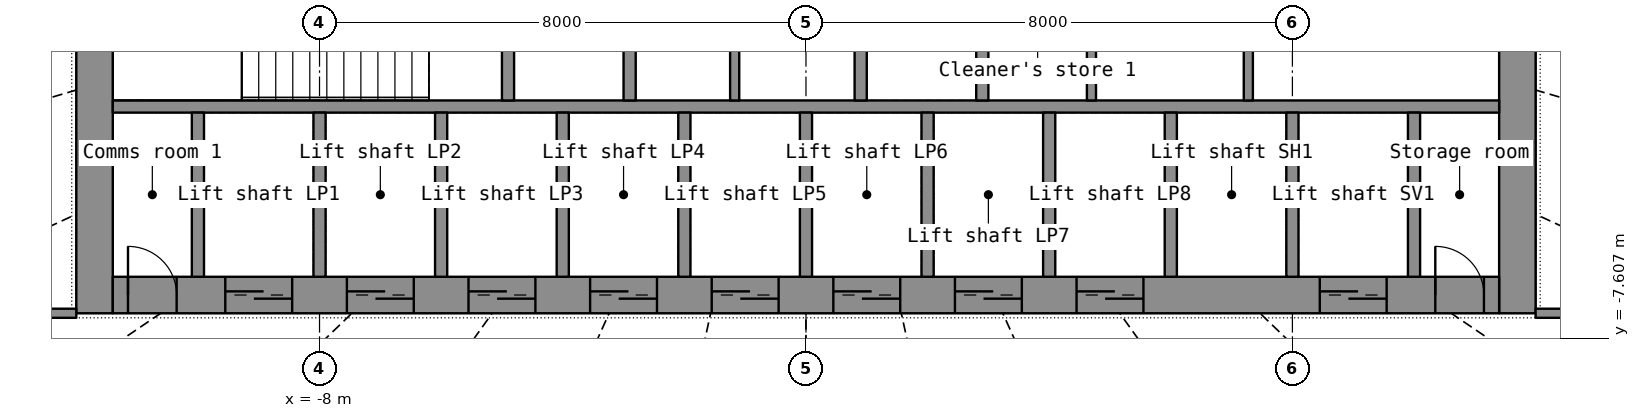
"""IFC4 building model, lengths in metres.
Left out: names, types, materials, properties, quantities, classifications, styles, units other than length and angle.
Written with IfcOpenShell. Run it as: python <this file> out.ifc"""

import sys

from ifc_helpers import new_model, si_unit, direction, frame, frame_2d, origin, place, context, subcontext, project, spatial, rectangle, extrude, element, fill, save


model = new_model("IFC4")
c1 = context("Model", 3, precision=1e-05, world=origin(), true_north=direction((0.0, 1.0)))
c2 = subcontext(c1, "Body", "Model", "MODEL_VIEW")
j1 = project(units=[si_unit("LENGTHUNIT", "METRE"), si_unit("PLANEANGLEUNIT", "RADIAN")], contexts=[c1])
p1 = place(None, origin())
s1 = spatial("IfcSite", under=j1, at=p1, CompositionType="ELEMENT")
p2 = place(p1, origin())
s2 = spatial("IfcBuilding", under=s1, at=p2, CompositionType="ELEMENT")
p3 = place(p2, frame((0.0, 0.0, 24.5)))
s3 = spatial("IfcBuildingStorey", under=s2, at=p3, CompositionType="ELEMENT", Elevation=24.5)
p4 = place(p3, frame((-11.7, -7.2, 0.0), z_axis=(0.0, 0.0, 1.0), x_axis=(0.0, 1.0, 0.0)))
e1 = element("IfcWall", 1, at=p4, inside=s3, PredefinedType="SHEAR", context=c2, shape_type="SweptSolid", body=[
    extrude(rectangle(XDim=14.4, YDim=0.6, at=frame_2d((7.2, 0.0))), origin(), (0.0, 0.0, 1.0), 3.8),
])
p5 = place(p4, frame((6.5, 0.0, 0.0)))
e2 = element("IfcOpeningElement", 2, at=p5, cuts=e1, PredefinedType="OPENING", context=c2, shape_type="SweptSolid", body=[
    extrude(rectangle(XDim=1.4, YDim=2.2, at=frame_2d((0.7, 1.1))), frame((0.0, 0.31, 0.0), z_axis=(0.0, -1.0, 0.0), x_axis=(1.0, 0.0, 0.0)), (0.0, 0.0, 1.0), 0.62),
])
p6 = place(p3, frame((11.7, -7.2, 0.0), z_axis=(0.0, 0.0, 1.0), x_axis=(0.0, 1.0, 0.0)))
e3 = element("IfcWall", 3, at=p6, inside=s3, PredefinedType="SHEAR", context=c2, shape_type="SweptSolid", body=[
    extrude(rectangle(XDim=14.4, YDim=0.6, at=frame_2d((7.2, 0.0))), origin(), (0.0, 0.0, 1.0), 3.8),
])
p7 = place(p6, frame((6.5, 0.0, 0.0)))
e4 = element("IfcOpeningElement", 4, at=p7, cuts=e3, PredefinedType="OPENING", context=c2, shape_type="SweptSolid", body=[
    extrude(rectangle(XDim=1.4, YDim=2.2, at=frame_2d((0.7, 1.1))), frame((0.0, 0.31, 0.0), z_axis=(0.0, -1.0, 0.0), x_axis=(1.0, 0.0, 0.0)), (0.0, 0.0, 1.0), 0.62),
])
p8 = place(p3, frame((-11.4, -6.9, 0.0), z_axis=(0.0, 0.0, 1.0), x_axis=(1.0, 0.0, 0.0)))
e5 = element("IfcWall", 5, at=p8, inside=s3, PredefinedType="SHEAR", context=c2, shape_type="SweptSolid", body=[
    extrude(rectangle(XDim=22.8, YDim=0.6, at=frame_2d((11.4, 0.0))), origin(), (0.0, 0.0, 1.0), 3.8),
])
p9 = place(p8, frame((1.85, 0.0, 0.0)))
e6 = element("IfcOpeningElement", 6, at=p9, cuts=e5, PredefinedType="OPENING", context=c2, shape_type="SweptSolid", body=[
    extrude(rectangle(XDim=1.1, YDim=2.2, at=frame_2d((0.55, 1.1))), frame((0.0, 0.31, 0.0), z_axis=(0.0, -1.0, 0.0), x_axis=(1.0, 0.0, 0.0)), (0.0, 0.0, 1.0), 0.62),
])
p10 = place(p8, frame((3.85, 0.0, 0.0)))
e7 = element("IfcOpeningElement", 7, at=p10, cuts=e5, PredefinedType="OPENING", context=c2, shape_type="SweptSolid", body=[
    extrude(rectangle(XDim=1.1, YDim=2.2, at=frame_2d((0.55, 1.1))), frame((0.0, 0.31, 0.0), z_axis=(0.0, -1.0, 0.0), x_axis=(1.0, 0.0, 0.0)), (0.0, 0.0, 1.0), 0.62),
])
p11 = place(p8, frame((5.85, 0.0, 0.0)))
e8 = element("IfcOpeningElement", 8, at=p11, cuts=e5, PredefinedType="OPENING", context=c2, shape_type="SweptSolid", body=[
    extrude(rectangle(XDim=1.1, YDim=2.2, at=frame_2d((0.55, 1.1))), frame((0.0, 0.31, 0.0), z_axis=(0.0, -1.0, 0.0), x_axis=(1.0, 0.0, 0.0)), (0.0, 0.0, 1.0), 0.62),
])
p12 = place(p8, frame((7.85, 0.0, 0.0)))
e9 = element("IfcOpeningElement", 9, at=p12, cuts=e5, PredefinedType="OPENING", context=c2, shape_type="SweptSolid", body=[
    extrude(rectangle(XDim=1.1, YDim=2.2, at=frame_2d((0.55, 1.1))), frame((0.0, 0.31, 0.0), z_axis=(0.0, -1.0, 0.0), x_axis=(1.0, 0.0, 0.0)), (0.0, 0.0, 1.0), 0.62),
])
p13 = place(p8, frame((9.85, 0.0, 0.0)))
e10 = element("IfcOpeningElement", 10, at=p13, cuts=e5, PredefinedType="OPENING", context=c2, shape_type="SweptSolid", body=[
    extrude(rectangle(XDim=1.1, YDim=2.2, at=frame_2d((0.55, 1.1))), frame((0.0, 0.31, 0.0), z_axis=(0.0, -1.0, 0.0), x_axis=(1.0, 0.0, 0.0)), (0.0, 0.0, 1.0), 0.62),
])
p14 = place(p8, frame((11.85, 0.0, 0.0)))
e11 = element("IfcOpeningElement", 11, at=p14, cuts=e5, PredefinedType="OPENING", context=c2, shape_type="SweptSolid", body=[
    extrude(rectangle(XDim=1.1, YDim=2.2, at=frame_2d((0.55, 1.1))), frame((0.0, 0.31, 0.0), z_axis=(0.0, -1.0, 0.0), x_axis=(1.0, 0.0, 0.0)), (0.0, 0.0, 1.0), 0.62),
])
p15 = place(p8, frame((13.85, 0.0, 0.0)))
e12 = element("IfcOpeningElement", 12, at=p15, cuts=e5, PredefinedType="OPENING", context=c2, shape_type="SweptSolid", body=[
    extrude(rectangle(XDim=1.1, YDim=2.2, at=frame_2d((0.55, 1.1))), frame((0.0, 0.31, 0.0), z_axis=(0.0, -1.0, 0.0), x_axis=(1.0, 0.0, 0.0)), (0.0, 0.0, 1.0), 0.62),
])
p16 = place(p8, frame((15.85, 0.0, 0.0)))
e13 = element("IfcOpeningElement", 13, at=p16, cuts=e5, PredefinedType="OPENING", context=c2, shape_type="SweptSolid", body=[
    extrude(rectangle(XDim=1.1, YDim=2.2, at=frame_2d((0.55, 1.1))), frame((0.0, 0.31, 0.0), z_axis=(0.0, -1.0, 0.0), x_axis=(1.0, 0.0, 0.0)), (0.0, 0.0, 1.0), 0.62),
])
p17 = place(p8, frame((19.85, 0.0, 0.0)))
e14 = element("IfcOpeningElement", 14, at=p17, cuts=e5, PredefinedType="OPENING", context=c2, shape_type="SweptSolid", body=[
    extrude(rectangle(XDim=1.1, YDim=2.2, at=frame_2d((0.55, 1.1))), frame((0.0, 0.31, 0.0), z_axis=(0.0, -1.0, 0.0), x_axis=(1.0, 0.0, 0.0)), (0.0, 0.0, 1.0), 0.62),
])
p18 = place(p8, frame((0.25, 0.0, 0.0)))
e15 = element("IfcOpeningElement", 15, at=p18, cuts=e5, PredefinedType="OPENING", context=c2, shape_type="SweptSolid", body=[
    extrude(rectangle(XDim=0.8, YDim=2.05, at=frame_2d((0.4, 1.025))), frame((0.0, 0.31, 0.0), z_axis=(0.0, -1.0, 0.0), x_axis=(1.0, 0.0, 0.0)), (0.0, 0.0, 1.0), 0.62),
])
p19 = place(p8, frame((21.75, 0.0, 0.0)))
e16 = element("IfcOpeningElement", 16, at=p19, cuts=e5, PredefinedType="OPENING", context=c2, shape_type="SweptSolid", body=[
    extrude(rectangle(XDim=0.8, YDim=2.05, at=frame_2d((0.4, 1.025))), frame((0.0, 0.31, 0.0), z_axis=(0.0, -1.0, 0.0), x_axis=(1.0, 0.0, 0.0)), (0.0, 0.0, 1.0), 0.62),
])
p20 = place(p3, frame((-11.4, -3.8, 0.0), z_axis=(0.0, 0.0, 1.0), x_axis=(1.0, 0.0, 0.0)))
e17 = element("IfcWall", 17, at=p20, inside=s3, PredefinedType="SHEAR", context=c2, shape_type="SweptSolid", body=[
    extrude(rectangle(XDim=22.8, YDim=0.2, at=frame_2d((11.4, 0.0))), origin(), (0.0, 0.0, 1.0), 3.8),
])
for number, where, z_axis, x_axis in (
    (18, (-10.0, -6.6, 0.0), (0.0, 0.0, 1.0), (0.0, 1.0, 0.0)),
    (19, (-8.0, -6.6, 0.0), (0.0, 0.0, 1.0), (0.0, 1.0, 0.0)),
    (20, (-6.0, -6.6, 0.0), (0.0, 0.0, 1.0), (0.0, 1.0, 0.0)),
    (21, (-4.0, -6.6, 0.0), (0.0, 0.0, 1.0), (0.0, 1.0, 0.0)),
    (22, (-2.0, -6.6, 0.0), (0.0, 0.0, 1.0), (0.0, 1.0, 0.0)),
    (23, (0.0, -6.6, 0.0), (0.0, 0.0, 1.0), (0.0, 1.0, 0.0)),
    (24, (2.0, -6.6, 0.0), (0.0, 0.0, 1.0), (0.0, 1.0, 0.0)),
    (25, (4.0, -6.6, 0.0), (0.0, 0.0, 1.0), (0.0, 1.0, 0.0)),
    (26, (6.0, -6.6, 0.0), (0.0, 0.0, 1.0), (0.0, 1.0, 0.0)),
    (27, (8.0, -6.6, 0.0), (0.0, 0.0, 1.0), (0.0, 1.0, 0.0)),
    (28, (10.0, -6.6, 0.0), (0.0, 0.0, 1.0), (0.0, 1.0, 0.0)),
):
    element("IfcWall", number, at=place(p3, frame(where, z_axis=z_axis, x_axis=x_axis)), inside=s3, PredefinedType="SHEAR", context=c2, shape_type="SweptSolid", body=[
        extrude(rectangle(XDim=2.7, YDim=0.2, at=frame_2d((1.35, 0.0))), origin(), (0.0, 0.0, 1.0), 3.8),
    ])
p21 = place(p3, frame((-2.9, -3.7, 0.0), z_axis=(0.0, 0.0, 1.0), x_axis=(0.0, 1.0, 0.0)))
e29 = element("IfcWall", 29, at=p21, inside=s3, PredefinedType="SHEAR", context=c2, shape_type="SweptSolid", body=[
    extrude(rectangle(XDim=7.4, YDim=0.2, at=frame_2d((3.7, 0.0))), origin(), (0.0, 0.0, 1.0), 3.8),
])
p22 = place(p21, frame((3.1, 0.0, 0.0)))
e30 = element("IfcOpeningElement", 30, at=p22, cuts=e29, PredefinedType="OPENING", context=c2, shape_type="SweptSolid", body=[
    extrude(rectangle(XDim=1.2, YDim=2.2, at=frame_2d((0.6, 1.1))), frame((0.0, 0.11, 0.0), z_axis=(0.0, -1.0, 0.0), x_axis=(1.0, 0.0, 0.0)), (0.0, 0.0, 1.0), 0.22),
])
p23 = place(p3, frame((2.9, -3.7, 0.0), z_axis=(0.0, 0.0, 1.0), x_axis=(0.0, 1.0, 0.0)))
e31 = element("IfcWall", 31, at=p23, inside=s3, PredefinedType="SHEAR", context=c2, shape_type="SweptSolid", body=[
    extrude(rectangle(XDim=7.4, YDim=0.2, at=frame_2d((3.7, 0.0))), origin(), (0.0, 0.0, 1.0), 3.8),
])
p24 = place(p23, frame((3.1, 0.0, 0.0)))
e32 = element("IfcOpeningElement", 32, at=p24, cuts=e31, PredefinedType="OPENING", context=c2, shape_type="SweptSolid", body=[
    extrude(rectangle(XDim=1.2, YDim=2.2, at=frame_2d((0.6, 1.1))), frame((0.0, 0.11, 0.0), z_axis=(0.0, -1.0, 0.0), x_axis=(1.0, 0.0, 0.0)), (0.0, 0.0, 1.0), 0.22),
])
for number, where, z_axis, x_axis in (
    (33, (0.9, -3.7, 0.0), (0.0, 0.0, 1.0), (0.0, 1.0, 0.0)),
    (34, (-4.9, -3.7, 0.0), (0.0, 0.0, 1.0), (0.0, 1.0, 0.0)),
):
    element("IfcWall", number, at=place(p3, frame(where, z_axis=z_axis, x_axis=x_axis)), inside=s3, PredefinedType="SHEAR", context=c2, shape_type="SweptSolid", body=[
        extrude(rectangle(XDim=2.35, YDim=0.2, at=frame_2d((1.175, 0.0))), origin(), (0.0, 0.0, 1.0), 3.8),
    ])
for number, where, z_axis, x_axis in (
    (35, (4.695, -3.7, 0.0), (0.0, 0.0, 1.0), (0.0, 1.0, 0.0)),
    (36, (7.275, -3.7, 0.0), (0.0, 0.0, 1.0), (0.0, 1.0, 0.0)),
    (37, (-1.173, -3.7, 0.0), (0.0, 0.0, 1.0), (0.0, 1.0, 0.0)),
):
    element("IfcWall", number, at=place(p3, frame(where, z_axis=z_axis, x_axis=x_axis)), inside=s3, PredefinedType="PARTITIONING", context=c2, shape_type="SweptSolid", body=[
        extrude(rectangle(XDim=2.35, YDim=0.15, at=frame_2d((1.175, 0.0))), origin(), (0.0, 0.0, 1.0), 3.8),
    ])
p25 = place(p3, frame((-12.0, -7.2, 0.0), z_axis=(0.0, 0.0, 1.0), x_axis=(-1.0, 0.0, 0.0)))
e38 = element("IfcWall", 38, at=p25, inside=s3, PredefinedType="PARTITIONING", context=c2, shape_type="SweptSolid", body=[
    extrude(rectangle(XDim=3.923, YDim=0.15, at=frame_2d((1.961, 0.0))), origin(), (0.0, 0.0, 1.0), 2.8),
])
p26 = place(p25, frame((1.062, 0.0, 1.0)))
e39 = element("IfcOpeningElement", 39, at=p26, cuts=e38, PredefinedType="OPENING", context=c2, shape_type="SweptSolid", body=[
    extrude(rectangle(XDim=1.8, YDim=1.2, at=frame_2d((0.9, 0.6))), frame((0.0, 0.085, 0.0), z_axis=(0.0, -1.0, 0.0), x_axis=(1.0, 0.0, 0.0)), (0.0, 0.0, 1.0), 0.17),
])
p27 = place(p3, frame((15.923, -7.2, 0.0), z_axis=(0.0, 0.0, 1.0), x_axis=(-1.0, 0.0, 0.0)))
e40 = element("IfcWall", 40, at=p27, inside=s3, PredefinedType="PARTITIONING", context=c2, shape_type="SweptSolid", body=[
    extrude(rectangle(XDim=3.923, YDim=0.15, at=frame_2d((1.961, 0.0))), origin(), (0.0, 0.0, 1.0), 2.8),
])
p28 = place(p9, origin())
e41 = element("IfcDoor", 41, at=p28, inside=s3, OperationType="DOUBLE_DOOR_SLIDING", PredefinedType="DOOR", context=c2, shape_type="SweptSolid", body=[
    extrude(rectangle(XDim=1.1, YDim=2.2, at=frame_2d((0.55, 1.1))), frame((0.0, 0.025, 0.0), z_axis=(0.0, -1.0, 0.0), x_axis=(1.0, 0.0, 0.0)), (0.0, 0.0, 1.0), 0.05),
])
fill(e6, e41)
p29 = place(p10, origin())
e42 = element("IfcDoor", 42, at=p29, inside=s3, OperationType="DOUBLE_DOOR_SLIDING", PredefinedType="DOOR", context=c2, shape_type="SweptSolid", body=[
    extrude(rectangle(XDim=1.1, YDim=2.2, at=frame_2d((0.55, 1.1))), frame((0.0, 0.025, 0.0), z_axis=(0.0, -1.0, 0.0), x_axis=(1.0, 0.0, 0.0)), (0.0, 0.0, 1.0), 0.05),
])
fill(e7, e42)
p30 = place(p11, origin())
e43 = element("IfcDoor", 43, at=p30, inside=s3, OperationType="DOUBLE_DOOR_SLIDING", PredefinedType="DOOR", context=c2, shape_type="SweptSolid", body=[
    extrude(rectangle(XDim=1.1, YDim=2.2, at=frame_2d((0.55, 1.1))), frame((0.0, 0.025, 0.0), z_axis=(0.0, -1.0, 0.0), x_axis=(1.0, 0.0, 0.0)), (0.0, 0.0, 1.0), 0.05),
])
fill(e8, e43)
p31 = place(p12, origin())
e44 = element("IfcDoor", 44, at=p31, inside=s3, OperationType="DOUBLE_DOOR_SLIDING", PredefinedType="DOOR", context=c2, shape_type="SweptSolid", body=[
    extrude(rectangle(XDim=1.1, YDim=2.2, at=frame_2d((0.55, 1.1))), frame((0.0, 0.025, 0.0), z_axis=(0.0, -1.0, 0.0), x_axis=(1.0, 0.0, 0.0)), (0.0, 0.0, 1.0), 0.05),
])
fill(e9, e44)
p32 = place(p13, origin())
e45 = element("IfcDoor", 45, at=p32, inside=s3, OperationType="DOUBLE_DOOR_SLIDING", PredefinedType="DOOR", context=c2, shape_type="SweptSolid", body=[
    extrude(rectangle(XDim=1.1, YDim=2.2, at=frame_2d((0.55, 1.1))), frame((0.0, 0.025, 0.0), z_axis=(0.0, -1.0, 0.0), x_axis=(1.0, 0.0, 0.0)), (0.0, 0.0, 1.0), 0.05),
])
fill(e10, e45)
p33 = place(p14, origin())
e46 = element("IfcDoor", 46, at=p33, inside=s3, OperationType="DOUBLE_DOOR_SLIDING", PredefinedType="DOOR", context=c2, shape_type="SweptSolid", body=[
    extrude(rectangle(XDim=1.1, YDim=2.2, at=frame_2d((0.55, 1.1))), frame((0.0, 0.025, 0.0), z_axis=(0.0, -1.0, 0.0), x_axis=(1.0, 0.0, 0.0)), (0.0, 0.0, 1.0), 0.05),
])
fill(e11, e46)
p34 = place(p15, origin())
e47 = element("IfcDoor", 47, at=p34, inside=s3, OperationType="DOUBLE_DOOR_SLIDING", PredefinedType="DOOR", context=c2, shape_type="SweptSolid", body=[
    extrude(rectangle(XDim=1.1, YDim=2.2, at=frame_2d((0.55, 1.1))), frame((0.0, 0.025, 0.0), z_axis=(0.0, -1.0, 0.0), x_axis=(1.0, 0.0, 0.0)), (0.0, 0.0, 1.0), 0.05),
])
fill(e12, e47)
p35 = place(p16, origin())
e48 = element("IfcDoor", 48, at=p35, inside=s3, OperationType="DOUBLE_DOOR_SLIDING", PredefinedType="DOOR", context=c2, shape_type="SweptSolid", body=[
    extrude(rectangle(XDim=1.1, YDim=2.2, at=frame_2d((0.55, 1.1))), frame((0.0, 0.025, 0.0), z_axis=(0.0, -1.0, 0.0), x_axis=(1.0, 0.0, 0.0)), (0.0, 0.0, 1.0), 0.05),
])
fill(e13, e48)
p36 = place(p17, origin())
e49 = element("IfcDoor", 49, at=p36, inside=s3, OperationType="DOUBLE_DOOR_SLIDING", PredefinedType="DOOR", context=c2, shape_type="SweptSolid", body=[
    extrude(rectangle(XDim=1.1, YDim=2.2, at=frame_2d((0.55, 1.1))), frame((0.0, 0.025, 0.0), z_axis=(0.0, -1.0, 0.0), x_axis=(1.0, 0.0, 0.0)), (0.0, 0.0, 1.0), 0.05),
])
fill(e14, e49)
p37 = place(p18, origin())
e50 = element("IfcDoor", 50, at=p37, inside=s3, OperationType="SINGLE_SWING_LEFT", PredefinedType="DOOR", context=c2, shape_type="SweptSolid", body=[
    extrude(rectangle(XDim=0.8, YDim=2.05, at=frame_2d((0.4, 1.025))), frame((0.0, 0.025, 0.0), z_axis=(0.0, -1.0, 0.0), x_axis=(1.0, 0.0, 0.0)), (0.0, 0.0, 1.0), 0.05),
])
fill(e15, e50)
p38 = place(p19, origin())
e51 = element("IfcDoor", 51, at=p38, inside=s3, OperationType="SINGLE_SWING_LEFT", PredefinedType="DOOR", context=c2, shape_type="SweptSolid", body=[
    extrude(rectangle(XDim=0.8, YDim=2.05, at=frame_2d((0.4, 1.025))), frame((0.0, 0.025, 0.0), z_axis=(0.0, -1.0, 0.0), x_axis=(1.0, 0.0, 0.0)), (0.0, 0.0, 1.0), 0.05),
])
fill(e16, e51)
save(model, sys.argv[1])
